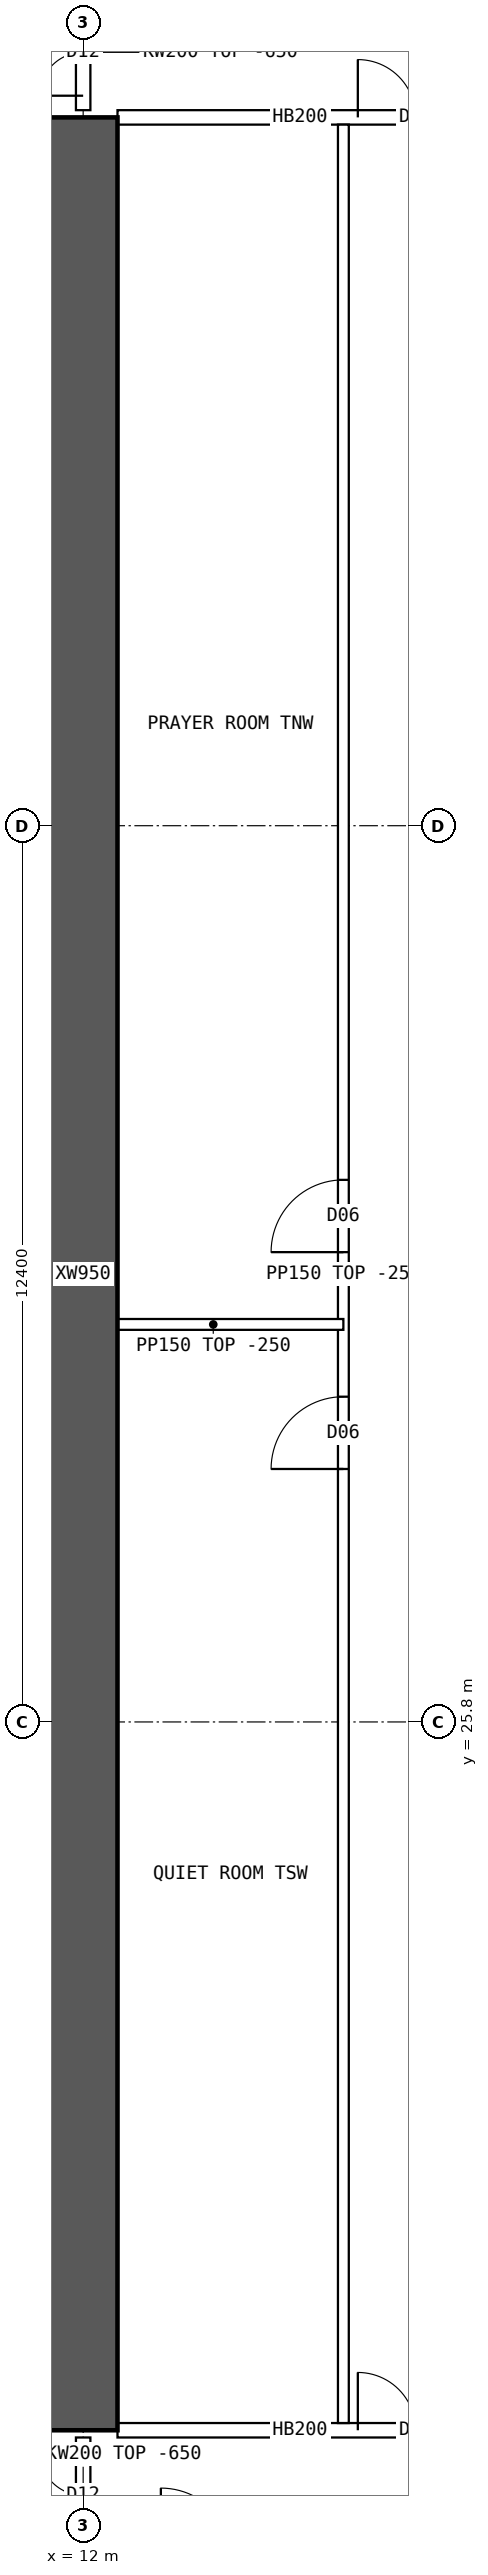
"""IFC4 building model, lengths in metres.
Left out: names, types, materials, properties, quantities, classifications, styles, units other than length and angle.
Written with IfcOpenShell. Run it as: python <this file> out.ifc"""

import sys

from ifc_helpers import new_model, si_unit, direction, frame, frame_2d, origin, place, context, subcontext, project, spatial, polyline, rectangle, outline, extrude, element, fill, save


model = new_model("IFC4")
c1 = context("Model", 3, precision=1e-05, world=origin(), true_north=direction((0.0, 1.0)))
c2 = subcontext(c1, "Body", "Model", "MODEL_VIEW")
j1 = project(units=[si_unit("LENGTHUNIT", "METRE"), si_unit("PLANEANGLEUNIT", "RADIAN")], contexts=[c1])
p1 = place(None, origin())
s1 = spatial("IfcSite", under=j1, at=p1, CompositionType="ELEMENT")
p2 = place(p1, origin())
s2 = spatial("IfcBuilding", under=s1, at=p2, CompositionType="ELEMENT")
p3 = place(p2, frame((0.0, 0.0, 99.4)))
s3 = spatial("IfcBuildingStorey", under=s2, at=p3, CompositionType="ELEMENT", Elevation=99.4)
p4 = place(p3, frame((12.0, 16.0, 0.0), z_axis=(0.0, 0.0, 1.0), x_axis=(0.0, 1.0, 0.0)))
e1 = element("IfcWall", 1, at=p4, inside=s3, PredefinedType="SHEAR", context=c2, shape_type="SweptSolid", body=[
    extrude(rectangle(XDim=32.0, YDim=0.95, at=frame_2d((16.0, 0.0))), origin(), (0.0, 0.0, 1.0), 3.75),
])
p5 = place(p3, frame((12.475, 16.0, 0.0), z_axis=(0.0, 0.0, 1.0), x_axis=(1.0, 0.0, 0.0)))
e2 = element("IfcWall", 2, at=p5, inside=s3, PredefinedType="SOLIDWALL", context=c2, shape_type="SweptSolid", body=[
    extrude(rectangle(XDim=5.05, YDim=0.2, at=frame_2d((2.525, 0.0))), origin(), (0.0, 0.0, 1.0), 3.5),
])
p6 = place(p5, frame((3.325, 0.0, 0.0)))
e3 = element("IfcOpeningElement", 3, at=p6, cuts=e2, PredefinedType="OPENING", context=c2, shape_type="SweptSolid", body=[
    extrude(rectangle(XDim=1.6, YDim=2.1, at=frame_2d((0.8, 1.05))), frame((0.0, 0.11, 0.0), z_axis=(0.0, -1.0, 0.0), x_axis=(1.0, 0.0, 0.0)), (0.0, 0.0, 1.0), 0.22),
])
p7 = place(p3, frame((12.475, 48.0, 0.0), z_axis=(0.0, 0.0, 1.0), x_axis=(1.0, 0.0, 0.0)))
e4 = element("IfcWall", 4, at=p7, inside=s3, PredefinedType="SOLIDWALL", context=c2, shape_type="SweptSolid", body=[
    extrude(rectangle(XDim=5.05, YDim=0.2, at=frame_2d((2.525, 0.0))), origin(), (0.0, 0.0, 1.0), 3.5),
])
p8 = place(p7, frame((3.325, 0.0, 0.0)))
e5 = element("IfcOpeningElement", 5, at=p8, cuts=e4, PredefinedType="OPENING", context=c2, shape_type="SweptSolid", body=[
    extrude(rectangle(XDim=1.6, YDim=2.1, at=frame_2d((0.8, 1.05))), frame((0.0, 0.11, 0.0), z_axis=(0.0, -1.0, 0.0), x_axis=(1.0, 0.0, 0.0)), (0.0, 0.0, 1.0), 0.22),
])
p9 = place(p3, frame((15.6, 16.1, 0.0), z_axis=(0.0, 0.0, 1.0), x_axis=(0.0, 1.0, 0.0)))
e6 = element("IfcWall", 6, at=p9, inside=s3, PredefinedType="PARTITIONING", context=c2, shape_type="SweptSolid", body=[
    extrude(rectangle(XDim=31.8, YDim=0.15, at=frame_2d((15.9, 0.0))), origin(), (0.0, 0.0, 1.0), 3.5),
])
p10 = place(p9, frame((13.2, 0.0, 0.0)))
e7 = element("IfcOpeningElement", 7, at=p10, cuts=e6, PredefinedType="OPENING", context=c2, shape_type="SweptSolid", body=[
    extrude(rectangle(XDim=1.0, YDim=2.1, at=frame_2d((0.5, 1.05))), frame((0.0, 0.085, 0.0), z_axis=(0.0, -1.0, 0.0), x_axis=(1.0, 0.0, 0.0)), (0.0, 0.0, 1.0), 0.17),
])
p11 = place(p9, frame((16.2, 0.0, 0.0)))
e8 = element("IfcOpeningElement", 8, at=p11, cuts=e6, PredefinedType="OPENING", context=c2, shape_type="SweptSolid", body=[
    extrude(rectangle(XDim=1.0, YDim=2.1, at=frame_2d((0.5, 1.05))), frame((0.0, 0.085, 0.0), z_axis=(0.0, -1.0, 0.0), x_axis=(1.0, 0.0, 0.0)), (0.0, 0.0, 1.0), 0.17),
])
p12 = place(p3, frame((12.0, 31.3, 0.0), z_axis=(0.0, 0.0, 1.0), x_axis=(1.0, 0.0, 0.0)))
e9 = element("IfcWall", 9, at=p12, inside=s3, PredefinedType="PARTITIONING", context=c2, shape_type="SweptSolid", body=[
    extrude(rectangle(XDim=3.6, YDim=0.15, at=frame_2d((1.8, 0.0))), origin(), (0.0, 0.0, 1.0), 3.5),
])
p13 = place(p3, frame((3.905, 30.85, 0.0), z_axis=(0.0, 0.0, 1.0), x_axis=(1.0, 0.0, 0.0)))
e10 = element("IfcWall", 10, at=p13, inside=s3, PredefinedType="PARTITIONING", context=c2, shape_type="SweptSolid", body=[
    extrude(outline(polyline([(0.0, 0.0), (8.02, 0.0), (8.02, 3.5), (2.397, 3.5), (2.395, 3.05), (1.797, 3.05), (1.795, 3.5), (0.0, 3.5), (0.0, 0.0)])), frame((0.0, 0.075, 0.0), z_axis=(0.0, -1.0, 0.0), x_axis=(1.0, 0.0, 0.0)), (0.0, 0.0, 1.0), 0.15),
])
p14 = place(p3, frame((12.0, 14.3, 0.0), z_axis=(0.0, 0.0, 1.0), x_axis=(0.0, 1.0, 0.0)))
e11 = element("IfcWall", 11, at=p14, inside=s3, PredefinedType="SOLIDWALL", context=c2, shape_type="SweptSolid", body=[
    extrude(outline(polyline([(0.0, 0.0), (1.6, 0.0), (1.6, 3.1), (0.0, 3.1), (0.0, 0.0)])), frame((0.0, 0.1, 0.0), z_axis=(0.0, -1.0, 0.0), x_axis=(1.0, 0.0, 0.0)), (0.0, 0.0, 1.0), 0.2),
])
p15 = place(p14, frame((0.2, 0.0, 0.0)))
e12 = element("IfcOpeningElement", 12, at=p15, cuts=e11, PredefinedType="OPENING", context=c2, shape_type="SweptSolid", body=[
    extrude(rectangle(XDim=1.2, YDim=2.1, at=frame_2d((0.6, 1.05))), frame((0.0, 0.11, 0.0), z_axis=(0.0, -1.0, 0.0), x_axis=(1.0, 0.0, 0.0)), (0.0, 0.0, 1.0), 0.22),
])
p16 = place(p3, frame((12.0, 48.1, 0.0), z_axis=(0.0, 0.0, 1.0), x_axis=(0.0, 1.0, 0.0)))
e13 = element("IfcWall", 13, at=p16, inside=s3, PredefinedType="SOLIDWALL", context=c2, shape_type="SweptSolid", body=[
    extrude(outline(polyline([(0.0, 0.0), (1.6, 0.0), (1.6, 3.1), (0.0, 3.1), (0.0, 0.0)])), frame((0.0, 0.1, 0.0), z_axis=(0.0, -1.0, 0.0), x_axis=(1.0, 0.0, 0.0)), (0.0, 0.0, 1.0), 0.2),
])
p17 = place(p16, frame((0.2, 0.0, 0.0)))
e14 = element("IfcOpeningElement", 14, at=p17, cuts=e13, PredefinedType="OPENING", context=c2, shape_type="SweptSolid", body=[
    extrude(rectangle(XDim=1.2, YDim=2.1, at=frame_2d((0.6, 1.05))), frame((0.0, 0.11, 0.0), z_axis=(0.0, -1.0, 0.0), x_axis=(1.0, 0.0, 0.0)), (0.0, 0.0, 1.0), 0.22),
])
p18 = place(p6, origin())
e15 = element("IfcDoor", 15, at=p18, inside=s3, OperationType="DOUBLE_DOOR_SINGLE_SWING", PredefinedType="DOOR", context=c2, shape_type="SweptSolid", body=[
    extrude(rectangle(XDim=1.6, YDim=2.1, at=frame_2d((0.8, 1.05))), frame((0.0, 0.025, 0.0), z_axis=(0.0, -1.0, 0.0), x_axis=(1.0, 0.0, 0.0)), (0.0, 0.0, 1.0), 0.05),
])
fill(e3, e15)
p19 = place(p8, origin())
e16 = element("IfcDoor", 16, at=p19, inside=s3, OperationType="DOUBLE_DOOR_SINGLE_SWING", PredefinedType="DOOR", context=c2, shape_type="SweptSolid", body=[
    extrude(rectangle(XDim=1.6, YDim=2.1, at=frame_2d((0.8, 1.05))), frame((0.0, 0.025, 0.0), z_axis=(0.0, -1.0, 0.0), x_axis=(1.0, 0.0, 0.0)), (0.0, 0.0, 1.0), 0.05),
])
fill(e5, e16)
p20 = place(p10, origin())
e17 = element("IfcDoor", 17, at=p20, inside=s3, OperationType="SINGLE_SWING_LEFT", PredefinedType="DOOR", context=c2, shape_type="SweptSolid", body=[
    extrude(rectangle(XDim=1.0, YDim=2.1, at=frame_2d((0.5, 1.05))), frame((0.0, 0.025, 0.0), z_axis=(0.0, -1.0, 0.0), x_axis=(1.0, 0.0, 0.0)), (0.0, 0.0, 1.0), 0.05),
])
fill(e7, e17)
p21 = place(p11, origin())
e18 = element("IfcDoor", 18, at=p21, inside=s3, OperationType="SINGLE_SWING_LEFT", PredefinedType="DOOR", context=c2, shape_type="SweptSolid", body=[
    extrude(rectangle(XDim=1.0, YDim=2.1, at=frame_2d((0.5, 1.05))), frame((0.0, 0.025, 0.0), z_axis=(0.0, -1.0, 0.0), x_axis=(1.0, 0.0, 0.0)), (0.0, 0.0, 1.0), 0.05),
])
fill(e8, e18)
p22 = place(p15, origin())
e19 = element("IfcDoor", 19, at=p22, inside=s3, OperationType="DOUBLE_DOOR_SINGLE_SWING", PredefinedType="DOOR", context=c2, shape_type="SweptSolid", body=[
    extrude(rectangle(XDim=1.2, YDim=2.1, at=frame_2d((0.6, 1.05))), frame((0.0, 0.025, 0.0), z_axis=(0.0, -1.0, 0.0), x_axis=(1.0, 0.0, 0.0)), (0.0, 0.0, 1.0), 0.05),
])
fill(e12, e19)
p23 = place(p17, origin())
e20 = element("IfcDoor", 20, at=p23, inside=s3, OperationType="DOUBLE_DOOR_SINGLE_SWING", PredefinedType="DOOR", context=c2, shape_type="SweptSolid", body=[
    extrude(rectangle(XDim=1.2, YDim=2.1, at=frame_2d((0.6, 1.05))), frame((0.0, 0.025, 0.0), z_axis=(0.0, -1.0, 0.0), x_axis=(1.0, 0.0, 0.0)), (0.0, 0.0, 1.0), 0.05),
])
fill(e14, e20)
save(model, sys.argv[1])
